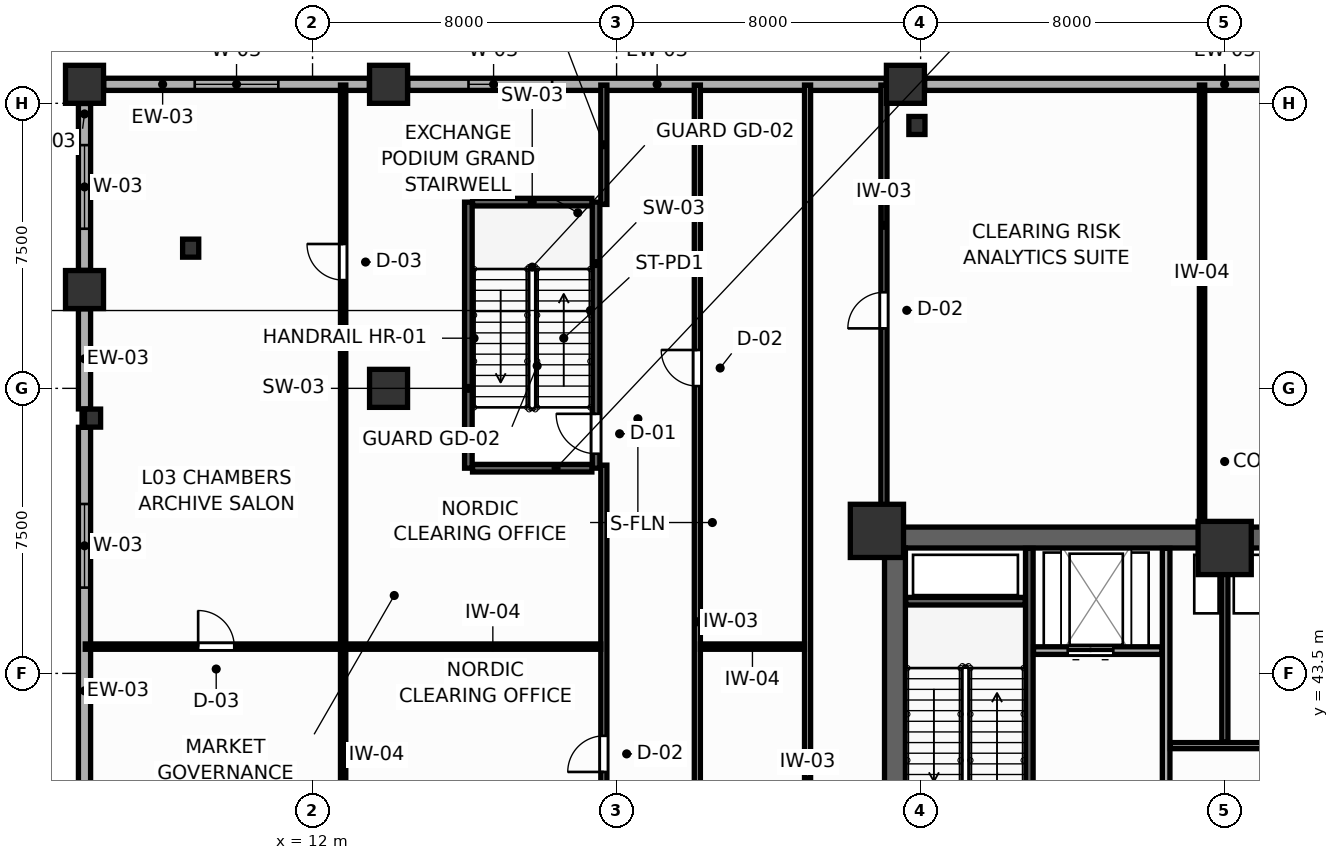
"""IFC4 building model, lengths in metres.
Left out: names, types, materials, properties, quantities, classifications, styles, units other than length and angle.
Written with IfcOpenShell. Run it as: python <this file> out.ifc"""

import sys

from ifc_helpers import new_model, si_unit, direction, frame, frame_2d, origin, origin_2d, place, context, subcontext, project, spatial, rectangle, i_section, extrude, source, transform, mapped, element, fill, save


model = new_model("IFC4")
c1 = context("Model", 3, precision=1e-05, world=origin(), true_north=direction((0.0, 1.0)))
c2 = subcontext(c1, "Body", "Model", "MODEL_VIEW")
j1 = project(units=[si_unit("LENGTHUNIT", "METRE"), si_unit("PLANEANGLEUNIT", "RADIAN")], contexts=[c1])
p1 = place(None, origin())
s1 = spatial("IfcSite", under=j1, at=p1, CompositionType="ELEMENT")
p2 = place(p1, origin())
s2 = spatial("IfcBuilding", under=s1, at=p2, CompositionType="ELEMENT")
p3 = place(p2, frame((0.0, 0.0, 14.4)))
s3 = spatial("IfcBuildingStorey", under=s2, at=p3, CompositionType="ELEMENT", Elevation=14.4)
p4 = place(p3, frame((27.05, 47.075, 0.0), z_axis=(0.0, 0.0, 1.0), x_axis=(1.0, 0.0, 0.0)))
e1 = element("IfcWall", 1, at=p4, inside=s3, PredefinedType="SHEAR", context=c2, shape_type="SweptSolid", body=[
    extrude(rectangle(XDim=17.9, YDim=0.55, at=frame_2d((8.95, 0.0))), origin(), (0.0, 0.0, 1.0), 4.8),
])
p5 = place(p3, frame((27.325, 37.8, 0.0), z_axis=(0.0, 0.0, 1.0), x_axis=(0.0, 1.0, 0.0)))
e2 = element("IfcWall", 2, at=p5, inside=s3, PredefinedType="SHEAR", context=c2, shape_type="SweptSolid", body=[
    extrude(rectangle(XDim=9.0, YDim=0.55, at=frame_2d((4.5, 0.0))), origin(), (0.0, 0.0, 1.0), 4.8),
])
m1 = source(origin(), c2, "Body", "SweptSolid", [
    extrude(rectangle(XDim=1.4, YDim=1.4, at=origin_2d()), origin(), (0.0, 0.0, 1.0), 4.8),
])
for number, where, z_axis, x_axis in (
    (3, (26.85, 47.25, 0.0), (0.0, 0.0, 1.0), (1.0, 0.0, 0.0)),
    (4, (36.0, 46.8, 0.0), (0.0, 0.0, 1.0), (1.0, 0.0, 0.0)),
):
    element("IfcColumn", number, at=place(p3, frame(where, z_axis=z_axis, x_axis=x_axis)), inside=s3, PredefinedType="COLUMN", context=c2, shape_type="MappedRepresentation", body=[
        mapped(m1, transform((0.0, 0.0, 0.0), scale=1.0)),
    ])
m2 = source(origin(), c2, "Body", "SweptSolid", [
    extrude(rectangle(XDim=1.0, YDim=1.0, at=origin_2d()), origin(), (0.0, 0.0, 1.0), 4.8),
])
for number, where, z_axis, x_axis in (
    (5, (6.0, 53.6, 0.0), (0.0, 0.0, 1.0), (1.0, 0.0, 0.0)),
    (6, (6.0, 59.0, 0.0), (0.0, 0.0, 1.0), (1.0, 0.0, 0.0)),
    (7, (14.0, 59.0, 0.0), (0.0, 0.0, 1.0), (1.0, 0.0, 0.0)),
    (8, (27.6, 59.0, 0.0), (0.0, 0.0, 1.0), (1.0, 0.0, 0.0)),
    (9, (14.0, 51.0, 0.0), (0.0, 0.0, 1.0), (1.0, 0.0, 0.0)),
):
    element("IfcColumn", number, at=place(p3, frame(where, z_axis=z_axis, x_axis=x_axis)), inside=s3, PredefinedType="COLUMN", context=c2, shape_type="MappedRepresentation", body=[
        mapped(m2, transform((0.0, 0.0, 0.0), scale=1.0)),
    ])
m3 = source(origin(), c2, "Body", "SweptSolid", [
    extrude(i_section(OverallWidth=0.424, OverallDepth=0.474, WebThickness=0.045, FlangeThickness=0.072, FilletRadius=0.015, at=origin_2d()), origin(), (0.0, 0.0, 1.0), 4.8),
])
for number, where, z_axis, x_axis in (
    (10, (27.903, 57.917, 0.0), (0.0, 0.0, 1.0), (1.0, 0.0, 0.0)),
    (11, (8.793, 54.689, 0.0), (0.0, 0.0, 1.0), (1.0, 0.0, 0.0)),
    (12, (6.211, 50.217, 0.0), (0.0, 0.0, 1.0), (1.0, 0.0, 0.0)),
):
    element("IfcColumn", number, at=place(p3, frame(where, z_axis=z_axis, x_axis=x_axis)), inside=s3, PredefinedType="COLUMN", context=c2, shape_type="MappedRepresentation", body=[
        mapped(m3, transform((0.0, 0.0, 0.0), scale=1.0)),
    ])
p6 = place(p3, frame((6.505, 59.0, 0.0), z_axis=(0.0, 0.0, 1.0), x_axis=(1.0, 0.0, 0.0)))
e13 = element("IfcWall", 13, at=p6, inside=s3, PredefinedType="SOLIDWALL", context=c2, shape_type="SweptSolid", body=[
    extrude(rectangle(XDim=6.99, YDim=0.32, at=frame_2d((3.495, 0.0))), origin(), (0.0, 0.0, 1.0), 3.82),
])
p7 = place(p6, frame((2.395, 0.0, 0.75)))
e14 = element("IfcOpeningElement", 14, at=p7, cuts=e13, PredefinedType="OPENING", context=c2, shape_type="SweptSolid", body=[
    extrude(rectangle(XDim=2.2, YDim=2.0, at=frame_2d((1.1, 1.0))), frame((0.0, 0.17, 0.0), z_axis=(0.0, -1.0, 0.0), x_axis=(1.0, 0.0, 0.0)), (0.0, 0.0, 1.0), 0.34),
])
p8 = place(p3, frame((14.505, 59.0, 0.0), z_axis=(0.0, 0.0, 1.0), x_axis=(1.0, 0.0, 0.0)))
e15 = element("IfcWall", 15, at=p8, inside=s3, PredefinedType="SOLIDWALL", context=c2, shape_type="SweptSolid", body=[
    extrude(rectangle(XDim=12.59, YDim=0.32, at=frame_2d((6.295, 0.0))), origin(), (0.0, 0.0, 1.0), 3.82),
])
p9 = place(p8, frame((1.599, 0.0, 0.75)))
e16 = element("IfcOpeningElement", 16, at=p9, cuts=e15, PredefinedType="OPENING", context=c2, shape_type="SweptSolid", body=[
    extrude(rectangle(XDim=2.2, YDim=2.0, at=frame_2d((1.1, 1.0))), frame((0.0, 0.17, 0.0), z_axis=(0.0, -1.0, 0.0), x_axis=(1.0, 0.0, 0.0)), (0.0, 0.0, 1.0), 0.34),
])
p10 = place(p3, frame((28.105, 59.0, 0.0), z_axis=(0.0, 0.0, 1.0), x_axis=(1.0, 0.0, 0.0)))
e17 = element("IfcWall", 17, at=p10, inside=s3, PredefinedType="SOLIDWALL", context=c2, shape_type="SweptSolid", body=[
    extrude(rectangle(XDim=15.79, YDim=0.32, at=frame_2d((7.895, 0.0))), origin(), (0.0, 0.0, 1.0), 3.82),
])
p11 = place(p3, frame((6.0, 40.505, 0.0), z_axis=(0.0, 0.0, 1.0), x_axis=(0.0, 1.0, 0.0)))
e18 = element("IfcWall", 18, at=p11, inside=s3, PredefinedType="SOLIDWALL", context=c2, shape_type="SweptSolid", body=[
    extrude(rectangle(XDim=9.47, YDim=0.32, at=frame_2d((4.735, 0.0))), origin(), (0.0, 0.0, 1.0), 3.82),
])
p12 = place(p11, frame((5.253, 0.0, 0.75)))
e19 = element("IfcOpeningElement", 19, at=p12, cuts=e18, PredefinedType="OPENING", context=c2, shape_type="SweptSolid", body=[
    extrude(rectangle(XDim=2.2, YDim=2.0, at=frame_2d((1.1, 1.0))), frame((0.0, 0.17, 0.0), z_axis=(0.0, -1.0, 0.0), x_axis=(1.0, 0.0, 0.0)), (0.0, 0.0, 1.0), 0.34),
])
p13 = place(p3, frame((6.0, 50.459, 0.0), z_axis=(0.0, 0.0, 1.0), x_axis=(0.0, 1.0, 0.0)))
e20 = element("IfcWall", 20, at=p13, inside=s3, PredefinedType="SOLIDWALL", context=c2, shape_type="SweptSolid", body=[
    extrude(rectangle(XDim=2.636, YDim=0.32, at=frame_2d((1.318, 0.0))), origin(), (0.0, 0.0, 1.0), 3.82),
])
p14 = place(p3, frame((6.0, 54.105, 0.0), z_axis=(0.0, 0.0, 1.0), x_axis=(0.0, 1.0, 0.0)))
e21 = element("IfcWall", 21, at=p14, inside=s3, PredefinedType="SOLIDWALL", context=c2, shape_type="SweptSolid", body=[
    extrude(rectangle(XDim=4.39, YDim=0.32, at=frame_2d((2.195, 0.0))), origin(), (0.0, 0.0, 1.0), 3.82),
])
p15 = place(p14, frame((1.095, 0.0, 0.75)))
e22 = element("IfcOpeningElement", 22, at=p15, cuts=e21, PredefinedType="OPENING", context=c2, shape_type="SweptSolid", body=[
    extrude(rectangle(XDim=2.2, YDim=2.0, at=frame_2d((1.1, 1.0))), frame((0.0, 0.17, 0.0), z_axis=(0.0, -1.0, 0.0), x_axis=(1.0, 0.0, 0.0)), (0.0, 0.0, 1.0), 0.34),
])
p16 = place(p3, frame((30.86, 37.81, 0.0), z_axis=(0.0, 0.0, 1.0), x_axis=(0.0, 1.0, 0.0)))
e23 = element("IfcWall", 23, at=p16, inside=s3, PredefinedType="SHEAR", context=c2, shape_type="SweptSolid", body=[
    extrude(rectangle(XDim=8.98, YDim=0.2, at=frame_2d((4.49, 0.0))), origin(), (0.0, 0.0, 1.0), 4.8),
])
p17 = place(p16, frame((0.82, 0.0, 0.0)))
e24 = element("IfcOpeningElement", 24, at=p17, cuts=e23, PredefinedType="OPENING", context=c2, shape_type="SweptSolid", body=[
    extrude(rectangle(XDim=1.05, YDim=2.1, at=frame_2d((0.525, 1.05))), frame((0.0, 0.11, 0.0), z_axis=(0.0, -1.0, 0.0), x_axis=(1.0, 0.0, 0.0)), (0.0, 0.0, 1.0), 0.22),
])
p18 = place(p3, frame((27.61, 45.4, 0.0), z_axis=(0.0, 0.0, 1.0), x_axis=(1.0, 0.0, 0.0)))
e25 = element("IfcWall", 25, at=p18, inside=s3, PredefinedType="SHEAR", context=c2, shape_type="SweptSolid", body=[
    extrude(rectangle(XDim=3.14, YDim=0.2, at=frame_2d((1.57, 0.0))), origin(), (0.0, 0.0, 1.0), 4.8),
])
p19 = place(p3, frame((30.97, 44.1, 0.0), z_axis=(0.0, 0.0, 1.0), x_axis=(1.0, 0.0, 0.0)))
e26 = element("IfcWall", 26, at=p19, inside=s3, PredefinedType="PARTITIONING", context=c2, shape_type="SweptSolid", body=[
    extrude(rectangle(XDim=3.38, YDim=0.2, at=frame_2d((1.69, 0.0))), origin(), (0.0, 0.0, 1.0), 4.52),
])
p20 = place(p19, frame((0.9, 0.0, 0.0)))
e27 = element("IfcOpeningElement", 27, at=p20, cuts=e26, PredefinedType="OPENING", context=c2, shape_type="SweptSolid", body=[
    extrude(rectangle(XDim=1.2, YDim=2.1, at=frame_2d((0.6, 1.05))), frame((0.0, 0.11, 0.0), z_axis=(0.0, -1.0, 0.0), x_axis=(1.0, 0.0, 0.0)), (0.0, 0.0, 1.0), 0.22),
])
p21 = place(p3, frame((34.46, 37.81, 0.0), z_axis=(0.0, 0.0, 1.0), x_axis=(0.0, 1.0, 0.0)))
e28 = element("IfcWall", 28, at=p21, inside=s3, PredefinedType="PARTITIONING", context=c2, shape_type="SweptSolid", body=[
    extrude(rectangle(XDim=8.98, YDim=0.2, at=frame_2d((4.49, 0.0))), origin(), (0.0, 0.0, 1.0), 4.52),
])
p22 = place(p21, frame((0.65, 0.0, 0.0)))
e29 = element("IfcOpeningElement", 29, at=p22, cuts=e28, PredefinedType="OPENING", context=c2, shape_type="SweptSolid", body=[
    extrude(rectangle(XDim=0.85, YDim=2.05, at=frame_2d((0.425, 1.025))), frame((0.0, 0.11, 0.0), z_axis=(0.0, -1.0, 0.0), x_axis=(1.0, 0.0, 0.0)), (0.0, 0.0, 1.0), 0.22),
])
p23 = place(p3, frame((34.57, 41.6, 0.0), z_axis=(0.0, 0.0, 1.0), x_axis=(1.0, 0.0, 0.0)))
e30 = element("IfcWall", 30, at=p23, inside=s3, PredefinedType="PARTITIONING", context=c2, shape_type="SweptSolid", body=[
    extrude(rectangle(XDim=2.86, YDim=0.16, at=frame_2d((1.43, 0.0))), origin(), (0.0, 0.0, 1.0), 4.52),
])
p24 = place(p3, frame((36.005, 41.69, 0.0), z_axis=(0.0, 0.0, 1.0), x_axis=(0.0, 1.0, 0.0)))
e31 = element("IfcWall", 31, at=p24, inside=s3, PredefinedType="PARTITIONING", context=c2, shape_type="SweptSolid", body=[
    extrude(rectangle(XDim=5.1, YDim=0.16, at=frame_2d((2.55, 0.0))), origin(), (0.0, 0.0, 1.0), 4.52),
])
p25 = place(p3, frame((19.46, 48.9, 0.0), z_axis=(0.0, 0.0, 1.0), x_axis=(0.0, 1.0, 0.0)))
e32 = element("IfcWall", 32, at=p25, inside=s3, PredefinedType="SHEAR", context=c2, shape_type="SweptSolid", body=[
    extrude(rectangle(XDim=7.0, YDim=0.2, at=frame_2d((3.5, 0.0))), origin(), (0.0, 0.0, 1.0), 4.8),
])
p26 = place(p25, frame((0.38, 0.0, 0.0)))
e33 = element("IfcOpeningElement", 33, at=p26, cuts=e32, PredefinedType="OPENING", context=c2, shape_type="SweptSolid", body=[
    extrude(rectangle(XDim=1.05, YDim=2.1, at=frame_2d((0.525, 1.05))), frame((0.0, 0.11, 0.0), z_axis=(0.0, -1.0, 0.0), x_axis=(1.0, 0.0, 0.0)), (0.0, 0.0, 1.0), 0.22),
])
p27 = place(p3, frame((16.1, 48.9, 0.0), z_axis=(0.0, 0.0, 1.0), x_axis=(0.0, 1.0, 0.0)))
e34 = element("IfcWall", 34, at=p27, inside=s3, PredefinedType="SHEAR", context=c2, shape_type="SweptSolid", body=[
    extrude(rectangle(XDim=7.0, YDim=0.2, at=frame_2d((3.5, 0.0))), origin(), (0.0, 0.0, 1.0), 4.8),
])
for number, where, z_axis, x_axis in (
    (35, (16.21, 55.9, 0.0), (0.0, 0.0, 1.0), (1.0, 0.0, 0.0)),
    (36, (16.21, 48.9, 0.0), (0.0, 0.0, 1.0), (1.0, 0.0, 0.0)),
):
    element("IfcWall", number, at=place(p3, frame(where, z_axis=z_axis, x_axis=x_axis)), inside=s3, PredefinedType="SHEAR", context=c2, shape_type="SweptSolid", body=[
        extrude(rectangle(XDim=3.14, YDim=0.2, at=frame_2d((1.57, 0.0))), origin(), (0.0, 0.0, 1.0), 4.8),
    ])
p28 = place(p3, frame((22.125, 32.27, 0.0), z_axis=(0.0, 0.0, 1.0), x_axis=(0.0, 1.0, 0.0)))
e37 = element("IfcWall", 37, at=p28, inside=s3, PredefinedType="PARTITIONING", context=c2, shape_type="SweptSolid", body=[
    extrude(rectangle(XDim=26.71, YDim=0.16, at=frame_2d((13.355, 0.0))), origin(), (0.0, 0.0, 1.0), 4.52),
])
p29 = place(p28, frame((5.438, 0.0, 0.0)))
e38 = element("IfcOpeningElement", 38, at=p29, cuts=e37, PredefinedType="OPENING", context=c2, shape_type="SweptSolid", body=[
    extrude(rectangle(XDim=0.95, YDim=2.05, at=frame_2d((0.475, 1.025))), frame((0.0, 0.09, 0.0), z_axis=(0.0, -1.0, 0.0), x_axis=(1.0, 0.0, 0.0)), (0.0, 0.0, 1.0), 0.18),
])
p30 = place(p28, frame((18.79, 0.0, 0.0)))
e39 = element("IfcOpeningElement", 39, at=p30, cuts=e37, PredefinedType="OPENING", context=c2, shape_type="SweptSolid", body=[
    extrude(rectangle(XDim=0.95, YDim=2.05, at=frame_2d((0.475, 1.025))), frame((0.0, 0.09, 0.0), z_axis=(0.0, -1.0, 0.0), x_axis=(1.0, 0.0, 0.0)), (0.0, 0.0, 1.0), 0.18),
])
p31 = place(p3, frame((25.025, 32.27, 0.0), z_axis=(0.0, 0.0, 1.0), x_axis=(0.0, 1.0, 0.0)))
e40 = element("IfcWall", 40, at=p31, inside=s3, PredefinedType="PARTITIONING", context=c2, shape_type="SweptSolid", body=[
    extrude(rectangle(XDim=26.71, YDim=0.16, at=frame_2d((13.355, 0.0))), origin(), (0.0, 0.0, 1.0), 4.52),
])
p32 = place(p3, frame((19.665, 32.27, 0.0), z_axis=(0.0, 0.0, 1.0), x_axis=(0.0, 1.0, 0.0)))
e41 = element("IfcWall", 41, at=p32, inside=s3, PredefinedType="PARTITIONING", context=c2, shape_type="SweptSolid", body=[
    extrude(rectangle(XDim=16.71, YDim=0.16, at=frame_2d((8.355, 0.0))), origin(), (0.0, 0.0, 1.0), 4.52),
])
p33 = place(p32, frame((8.637, 0.0, 0.0)))
e42 = element("IfcOpeningElement", 42, at=p33, cuts=e41, PredefinedType="OPENING", context=c2, shape_type="SweptSolid", body=[
    extrude(rectangle(XDim=0.95, YDim=2.05, at=frame_2d((0.475, 1.025))), frame((0.0, 0.09, 0.0), z_axis=(0.0, -1.0, 0.0), x_axis=(1.0, 0.0, 0.0)), (0.0, 0.0, 1.0), 0.18),
])
p34 = place(p3, frame((27.035, 47.34, 0.0), z_axis=(0.0, 0.0, 1.0), x_axis=(0.0, 1.0, 0.0)))
e43 = element("IfcWall", 43, at=p34, inside=s3, PredefinedType="PARTITIONING", context=c2, shape_type="SweptSolid", body=[
    extrude(rectangle(XDim=11.64, YDim=0.16, at=frame_2d((5.82, 0.0))), origin(), (0.0, 0.0, 1.0), 4.52),
])
p35 = place(p34, frame((5.238, 0.0, 0.0)))
e44 = element("IfcOpeningElement", 44, at=p35, cuts=e43, PredefinedType="OPENING", context=c2, shape_type="SweptSolid", body=[
    extrude(rectangle(XDim=0.95, YDim=2.05, at=frame_2d((0.475, 1.025))), frame((0.0, 0.09, 0.0), z_axis=(0.0, -1.0, 0.0), x_axis=(1.0, 0.0, 0.0)), (0.0, 0.0, 1.0), 0.18),
])
p36 = place(p3, frame((19.665, 55.84, 0.0), z_axis=(0.0, 0.0, 1.0), x_axis=(0.0, 1.0, 0.0)))
e45 = element("IfcWall", 45, at=p36, inside=s3, PredefinedType="PARTITIONING", context=c2, shape_type="SweptSolid", body=[
    extrude(rectangle(XDim=3.14, YDim=0.16, at=frame_2d((1.57, 0.0))), origin(), (0.0, 0.0, 1.0), 4.52),
])
p37 = place(p3, frame((12.805, 36.06, 0.0), z_axis=(0.0, 0.0, 1.0), x_axis=(0.0, 1.0, 0.0)))
e46 = element("IfcWall", 46, at=p37, inside=s3, PredefinedType="PARTITIONING", context=c2, shape_type="SweptSolid", body=[
    extrude(rectangle(XDim=22.92, YDim=0.14, at=frame_2d((11.46, 0.0))), origin(), (0.0, 0.0, 1.0), 4.52),
])
p38 = place(p37, frame((17.789, 0.0, 0.0)))
e47 = element("IfcOpeningElement", 47, at=p38, cuts=e46, PredefinedType="OPENING", context=c2, shape_type="SweptSolid", body=[
    extrude(rectangle(XDim=0.95, YDim=2.05, at=frame_2d((0.475, 1.025))), frame((0.0, 0.08, 0.0), z_axis=(0.0, -1.0, 0.0), x_axis=(1.0, 0.0, 0.0)), (0.0, 0.0, 1.0), 0.16),
])
p39 = place(p3, frame((6.02, 44.205, 0.0), z_axis=(0.0, 0.0, 1.0), x_axis=(1.0, 0.0, 0.0)))
e48 = element("IfcWall", 48, at=p39, inside=s3, PredefinedType="PARTITIONING", context=c2, shape_type="SweptSolid", body=[
    extrude(rectangle(XDim=13.563, YDim=0.14, at=frame_2d((6.781, 0.0))), origin(), (0.0, 0.0, 1.0), 4.52),
])
p40 = place(p39, frame((2.97, 0.0, 0.0)))
e49 = element("IfcOpeningElement", 49, at=p40, cuts=e48, PredefinedType="OPENING", context=c2, shape_type="SweptSolid", body=[
    extrude(rectangle(XDim=0.95, YDim=2.05, at=frame_2d((0.475, 1.025))), frame((0.0, 0.08, 0.0), z_axis=(0.0, -1.0, 0.0), x_axis=(1.0, 0.0, 0.0)), (0.0, 0.0, 1.0), 0.16),
])
p41 = place(p3, frame((35.405, 47.352, 0.0), z_axis=(0.0, 0.0, 1.0), x_axis=(0.0, 1.0, 0.0)))
e50 = element("IfcWall", 50, at=p41, inside=s3, PredefinedType="PARTITIONING", context=c2, shape_type="SweptSolid", body=[
    extrude(rectangle(XDim=11.628, YDim=0.14, at=frame_2d((5.814, 0.0))), origin(), (0.0, 0.0, 1.0), 4.52),
])
p42 = place(p3, frame((22.207, 44.205, 0.0), z_axis=(0.0, 0.0, 1.0), x_axis=(1.0, 0.0, 0.0)))
e51 = element("IfcWall", 51, at=p42, inside=s3, PredefinedType="PARTITIONING", context=c2, shape_type="SweptSolid", body=[
    extrude(rectangle(XDim=2.736, YDim=0.14, at=frame_2d((1.368, 0.0))), origin(), (0.0, 0.0, 1.0), 4.52),
])
p43 = place(p7, origin())
e52 = element("IfcWindow", 52, at=p43, inside=s3, PartitioningType="SINGLE_PANEL", PredefinedType="WINDOW", context=c2, shape_type="SweptSolid", body=[
    extrude(rectangle(XDim=2.2, YDim=2.0, at=frame_2d((1.1, 1.0))), frame((0.0, 0.03, 0.0), z_axis=(0.0, -1.0, 0.0), x_axis=(1.0, 0.0, 0.0)), (0.0, 0.0, 1.0), 0.06),
])
fill(e14, e52)
p44 = place(p9, origin())
e53 = element("IfcWindow", 53, at=p44, inside=s3, PartitioningType="SINGLE_PANEL", PredefinedType="WINDOW", context=c2, shape_type="SweptSolid", body=[
    extrude(rectangle(XDim=2.2, YDim=2.0, at=frame_2d((1.1, 1.0))), frame((0.0, 0.03, 0.0), z_axis=(0.0, -1.0, 0.0), x_axis=(1.0, 0.0, 0.0)), (0.0, 0.0, 1.0), 0.06),
])
fill(e16, e53)
p45 = place(p12, origin())
e54 = element("IfcWindow", 54, at=p45, inside=s3, PartitioningType="SINGLE_PANEL", PredefinedType="WINDOW", context=c2, shape_type="SweptSolid", body=[
    extrude(rectangle(XDim=2.2, YDim=2.0, at=frame_2d((1.1, 1.0))), frame((0.0, 0.03, 0.0), z_axis=(0.0, -1.0, 0.0), x_axis=(1.0, 0.0, 0.0)), (0.0, 0.0, 1.0), 0.06),
])
fill(e19, e54)
p46 = place(p15, origin())
e55 = element("IfcWindow", 55, at=p46, inside=s3, PartitioningType="SINGLE_PANEL", PredefinedType="WINDOW", context=c2, shape_type="SweptSolid", body=[
    extrude(rectangle(XDim=2.2, YDim=2.0, at=frame_2d((1.1, 1.0))), frame((0.0, 0.03, 0.0), z_axis=(0.0, -1.0, 0.0), x_axis=(1.0, 0.0, 0.0)), (0.0, 0.0, 1.0), 0.06),
])
fill(e22, e55)
p47 = place(p20, origin())
e56 = element("IfcDoor", 56, at=p47, inside=s3, OperationType="DOUBLE_DOOR_SLIDING", PredefinedType="DOOR", context=c2, shape_type="SweptSolid", body=[
    extrude(rectangle(XDim=1.2, YDim=2.1, at=frame_2d((0.6, 1.05))), frame((0.0, 0.025, 0.0), z_axis=(0.0, -1.0, 0.0), x_axis=(1.0, 0.0, 0.0)), (0.0, 0.0, 1.0), 0.05),
])
fill(e27, e56)
p48 = place(p26, origin())
e57 = element("IfcDoor", 57, at=p48, inside=s3, OperationType="SINGLE_SWING_RIGHT", PredefinedType="DOOR", context=c2, shape_type="SweptSolid", body=[
    extrude(rectangle(XDim=1.05, YDim=2.1, at=frame_2d((0.525, 1.05))), frame((0.0, 0.025, 0.0), z_axis=(0.0, -1.0, 0.0), x_axis=(1.0, 0.0, 0.0)), (0.0, 0.0, 1.0), 0.05),
])
fill(e33, e57)
p49 = place(p30, origin())
e58 = element("IfcDoor", 58, at=p49, inside=s3, OperationType="SINGLE_SWING_RIGHT", PredefinedType="DOOR", context=c2, shape_type="SweptSolid", body=[
    extrude(rectangle(XDim=0.95, YDim=2.05, at=frame_2d((0.475, 1.025))), frame((0.0, 0.025, 0.0), z_axis=(0.0, -1.0, 0.0), x_axis=(1.0, 0.0, 0.0)), (0.0, 0.0, 1.0), 0.05),
])
fill(e39, e58)
p50 = place(p33, origin())
e59 = element("IfcDoor", 59, at=p50, inside=s3, OperationType="SINGLE_SWING_LEFT", PredefinedType="DOOR", context=c2, shape_type="SweptSolid", body=[
    extrude(rectangle(XDim=0.95, YDim=2.05, at=frame_2d((0.475, 1.025))), frame((0.0, 0.025, 0.0), z_axis=(0.0, -1.0, 0.0), x_axis=(1.0, 0.0, 0.0)), (0.0, 0.0, 1.0), 0.05),
])
fill(e42, e59)
p51 = place(p35, origin())
e60 = element("IfcDoor", 60, at=p51, inside=s3, OperationType="SINGLE_SWING_LEFT", PredefinedType="DOOR", context=c2, shape_type="SweptSolid", body=[
    extrude(rectangle(XDim=0.95, YDim=2.05, at=frame_2d((0.475, 1.025))), frame((0.0, 0.025, 0.0), z_axis=(0.0, -1.0, 0.0), x_axis=(1.0, 0.0, 0.0)), (0.0, 0.0, 1.0), 0.05),
])
fill(e44, e60)
p52 = place(p38, origin())
e61 = element("IfcDoor", 61, at=p52, inside=s3, OperationType="SINGLE_SWING_RIGHT", PredefinedType="DOOR", context=c2, shape_type="SweptSolid", body=[
    extrude(rectangle(XDim=0.95, YDim=2.05, at=frame_2d((0.475, 1.025))), frame((0.0, 0.025, 0.0), z_axis=(0.0, -1.0, 0.0), x_axis=(1.0, 0.0, 0.0)), (0.0, 0.0, 1.0), 0.05),
])
fill(e47, e61)
p53 = place(p40, origin())
e62 = element("IfcDoor", 62, at=p53, inside=s3, OperationType="SINGLE_SWING_LEFT", PredefinedType="DOOR", context=c2, shape_type="SweptSolid", body=[
    extrude(rectangle(XDim=0.95, YDim=2.05, at=frame_2d((0.475, 1.025))), frame((0.0, 0.025, 0.0), z_axis=(0.0, -1.0, 0.0), x_axis=(1.0, 0.0, 0.0)), (0.0, 0.0, 1.0), 0.05),
])
fill(e49, e62)
save(model, sys.argv[1])
